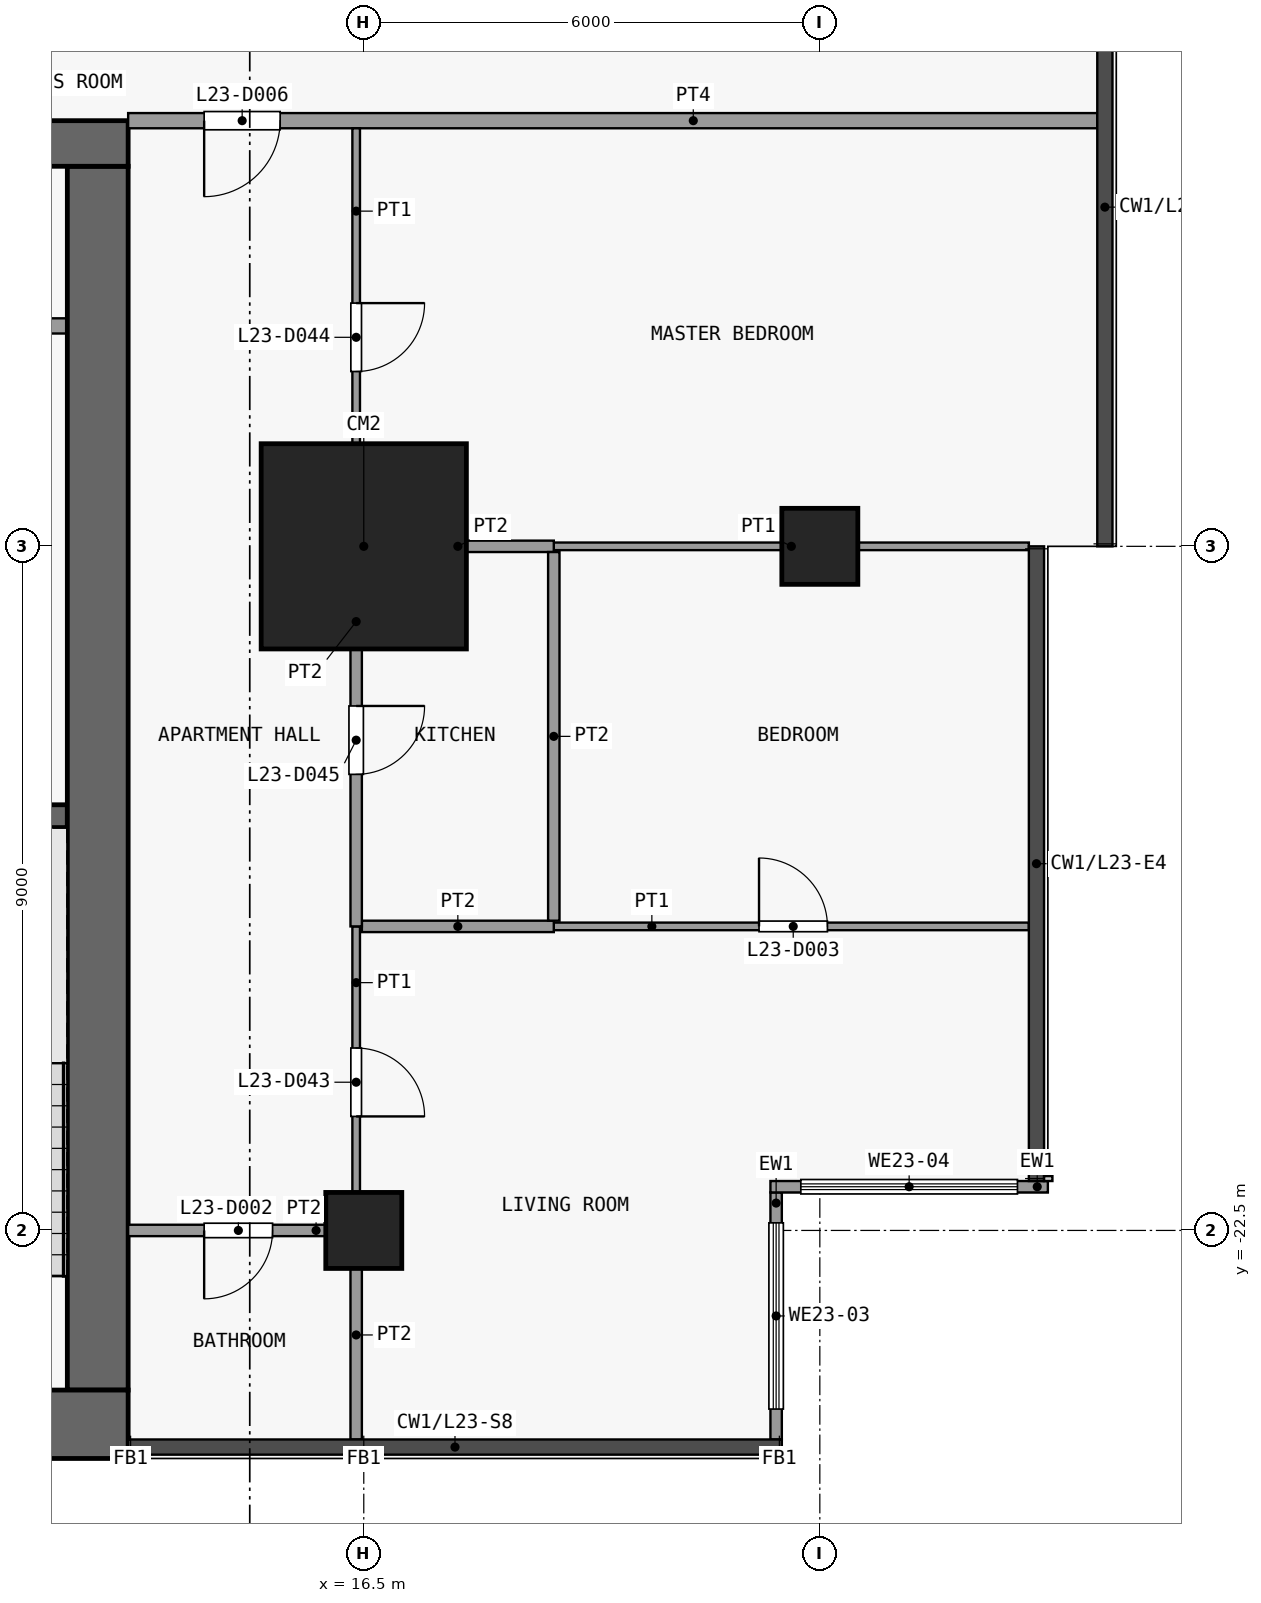
"""IFC4 building model, lengths in metres.
Left out: names, types, materials, properties, quantities, classifications, styles, units other than length and angle.
Written with IfcOpenShell. Run it as: python <this file> out.ifc"""

import sys

from ifc_helpers import new_model, si_unit, direction, frame, frame_2d, origin, origin_2d, place, context, subcontext, project, spatial, rectangle, extrude, element, fill, save


model = new_model("IFC4")
c1 = context("Model", 3, precision=1e-05, world=origin(), true_north=direction((0.0, 1.0)))
c2 = subcontext(c1, "Body", "Model", "MODEL_VIEW")
j1 = project(units=[si_unit("LENGTHUNIT", "METRE"), si_unit("PLANEANGLEUNIT", "RADIAN")], contexts=[c1])
p1 = place(None, origin())
s1 = spatial("IfcSite", under=j1, at=p1, CompositionType="ELEMENT")
p2 = place(p1, origin())
s2 = spatial("IfcBuilding", under=s1, at=p2, CompositionType="ELEMENT")
p3 = place(p2, frame((0.0, 0.0, 95.5)))
s3 = spatial("IfcBuildingStorey", under=s2, at=p3, CompositionType="ELEMENT", Elevation=95.5)
p4 = place(p3, frame((16.5, -22.5, 0.0), z_axis=(0.0, 0.0, 1.0), x_axis=(1.0, 0.0, 0.0)))
e1 = element("IfcColumn", 1, at=p4, inside=s3, PredefinedType="COLUMN", context=c2, shape_type="SweptSolid", body=[
    extrude(rectangle(XDim=1.0, YDim=1.0, at=origin_2d()), origin(), (0.0, 0.0, 1.0), 3.6),
])
p5 = place(p3, frame((16.5, -13.5, 0.0), z_axis=(0.0, 0.0, 1.0), x_axis=(1.0, 0.0, 0.0)))
e2 = element("IfcColumn", 2, at=p5, inside=s3, PredefinedType="COLUMN", context=c2, shape_type="SweptSolid", body=[
    extrude(rectangle(XDim=2.7, YDim=2.7, at=origin_2d()), origin(), (0.0, 0.0, 1.0), 3.6),
])
p6 = place(p3, frame((22.5, -13.5, 0.0), z_axis=(0.0, 0.0, 1.0), x_axis=(1.0, 0.0, 0.0)))
e3 = element("IfcColumn", 3, at=p6, inside=s3, PredefinedType="COLUMN", context=c2, shape_type="SweptSolid", body=[
    extrude(rectangle(XDim=1.0, YDim=1.0, at=origin_2d()), origin(), (0.0, 0.0, 1.0), 3.6),
])
p7 = place(p3, frame((-13.4, -25.05, 0.0), z_axis=(0.0, 0.0, 1.0), x_axis=(1.0, 0.0, 0.0)))
e4 = element("IfcWall", 4, at=p7, inside=s3, PredefinedType="SHEAR", context=c2, shape_type="SweptSolid", body=[
    extrude(rectangle(XDim=26.8, YDim=0.9, at=frame_2d((13.4, 0.0))), origin(), (0.0, 0.0, 1.0), 3.3),
])
p8 = place(p3, frame((-13.4, -8.2, 0.0), z_axis=(0.0, 0.0, 1.0), x_axis=(1.0, 0.0, 0.0)))
e5 = element("IfcWall", 5, at=p8, inside=s3, PredefinedType="SHEAR", context=c2, shape_type="SweptSolid", body=[
    extrude(rectangle(XDim=26.8, YDim=0.6, at=frame_2d((13.4, 0.0))), origin(), (0.0, 0.0, 1.0), 3.3),
])
p9 = place(p8, frame((7.7, 0.0, 0.0)))
e6 = element("IfcOpeningElement", 6, at=p9, cuts=e5, PredefinedType="OPENING", context=c2, shape_type="SweptSolid", body=[
    extrude(rectangle(XDim=1.8, YDim=2.1, at=frame_2d((0.9, 1.05))), frame((0.0, 0.31, 0.0), z_axis=(0.0, -1.0, 0.0), x_axis=(1.0, 0.0, 0.0)), (0.0, 0.0, 1.0), 0.62),
])
p10 = place(p8, frame((17.3, 0.0, 0.0)))
e7 = element("IfcOpeningElement", 7, at=p10, cuts=e5, PredefinedType="OPENING", context=c2, shape_type="SweptSolid", body=[
    extrude(rectangle(XDim=1.8, YDim=2.1, at=frame_2d((0.9, 1.05))), frame((0.0, 0.31, 0.0), z_axis=(0.0, -1.0, 0.0), x_axis=(1.0, 0.0, 0.0)), (0.0, 0.0, 1.0), 0.62),
])
p11 = place(p8, frame((2.625, 0.0, 0.0)))
e8 = element("IfcOpeningElement", 8, at=p11, cuts=e5, PredefinedType="OPENING", context=c2, shape_type="SweptSolid", body=[
    extrude(rectangle(XDim=0.9, YDim=2.1, at=frame_2d((0.45, 1.05))), frame((0.0, 0.31, 0.0), z_axis=(0.0, -1.0, 0.0), x_axis=(1.0, 0.0, 0.0)), (0.0, 0.0, 1.0), 0.62),
])
p12 = place(p8, frame((23.275, 0.0, 0.0)))
e9 = element("IfcOpeningElement", 9, at=p12, cuts=e5, PredefinedType="OPENING", context=c2, shape_type="SweptSolid", body=[
    extrude(rectangle(XDim=0.9, YDim=2.1, at=frame_2d((0.45, 1.05))), frame((0.0, 0.31, 0.0), z_axis=(0.0, -1.0, 0.0), x_axis=(1.0, 0.0, 0.0)), (0.0, 0.0, 1.0), 0.62),
])
p13 = place(p3, frame((13.0, -24.6, 0.0), z_axis=(0.0, 0.0, 1.0), x_axis=(0.0, 1.0, 0.0)))
e10 = element("IfcWall", 10, at=p13, inside=s3, PredefinedType="SHEAR", context=c2, shape_type="SweptSolid", body=[
    extrude(rectangle(XDim=16.1, YDim=0.8, at=frame_2d((8.05, 0.0))), origin(), (0.0, 0.0, 1.0), 3.3),
])
p14 = place(p3, frame((9.5, -17.05, 0.0), z_axis=(0.0, 0.0, 1.0), x_axis=(1.0, 0.0, 0.0)))
e11 = element("IfcWall", 11, at=p14, inside=s3, PredefinedType="SHEAR", context=c2, shape_type="SweptSolid", body=[
    extrude(rectangle(XDim=3.1, YDim=0.3, at=frame_2d((1.55, 0.0))), origin(), (0.0, 0.0, 1.0), 3.3),
])
p15 = place(p3, frame((11.15, -10.6, 0.0), z_axis=(0.0, 0.0, 1.0), x_axis=(1.0, 0.0, 0.0)))
e12 = element("IfcWall", 12, at=p15, inside=s3, PredefinedType="PARTITIONING", context=c2, shape_type="SweptSolid", body=[
    extrude(rectangle(XDim=1.45, YDim=0.2, at=frame_2d((0.725, 0.0))), origin(), (0.0, 0.0, 1.0), 3.3),
])
p16 = place(p3, frame((21.925, -22.0, 0.0), z_axis=(0.0, 0.0, 1.0), x_axis=(0.0, -1.0, 0.0)))
e13 = element("IfcWall", 13, at=p16, inside=s3, PredefinedType="SOLIDWALL", context=c2, shape_type="SweptSolid", body=[
    extrude(rectangle(XDim=3.25, YDim=0.15, at=frame_2d((1.625, 0.0))), origin(), (0.0, 0.0, 1.0), 3.3),
])
p17 = place(p16, frame((0.4, 0.0, 0.9)))
e14 = element("IfcOpeningElement", 14, at=p17, cuts=e13, PredefinedType="OPENING", context=c2, shape_type="SweptSolid", body=[
    extrude(rectangle(XDim=2.45, YDim=2.4, at=frame_2d((1.225, 1.2))), frame((0.0, 0.085, 0.0), z_axis=(0.0, -1.0, 0.0), x_axis=(1.0, 0.0, 0.0)), (0.0, 0.0, 1.0), 0.17),
])
p18 = place(p3, frame((25.5, -21.925, 0.0), z_axis=(0.0, 0.0, 1.0), x_axis=(-1.0, 0.0, 0.0)))
e15 = element("IfcWall", 15, at=p18, inside=s3, PredefinedType="SOLIDWALL", context=c2, shape_type="SweptSolid", body=[
    extrude(rectangle(XDim=3.65, YDim=0.15, at=frame_2d((1.825, 0.0))), origin(), (0.0, 0.0, 1.0), 3.3),
])
p19 = place(p18, frame((0.4, 0.0, 0.9)))
e16 = element("IfcOpeningElement", 16, at=p19, cuts=e15, PredefinedType="OPENING", context=c2, shape_type="SweptSolid", body=[
    extrude(rectangle(XDim=2.85, YDim=2.4, at=frame_2d((1.425, 1.2))), frame((0.0, 0.085, 0.0), z_axis=(0.0, -1.0, 0.0), x_axis=(1.0, 0.0, 0.0)), (0.0, 0.0, 1.0), 0.17),
])
p20 = place(p3, frame((13.4, -22.5, 0.0), z_axis=(0.0, 0.0, 1.0), x_axis=(1.0, 0.0, 0.0)))
e17 = element("IfcWall", 17, at=p20, inside=s3, PredefinedType="PARTITIONING", context=c2, shape_type="SweptSolid", body=[
    extrude(rectangle(XDim=2.925, YDim=0.15, at=frame_2d((1.462, 0.0))), origin(), (0.0, 0.0, 1.0), 3.3),
])
p21 = place(p20, frame((1.0, 0.0, 0.0)))
e18 = element("IfcOpeningElement", 18, at=p21, cuts=e17, PredefinedType="OPENING", context=c2, shape_type="SweptSolid", body=[
    extrude(rectangle(XDim=0.9, YDim=2.1, at=frame_2d((0.45, 1.05))), frame((0.0, 0.085, 0.0), z_axis=(0.0, -1.0, 0.0), x_axis=(1.0, 0.0, 0.0)), (0.0, 0.0, 1.0), 0.17),
])
p22 = place(p3, frame((19.0, -18.5, 0.0), z_axis=(0.0, 0.0, 1.0), x_axis=(1.0, 0.0, 0.0)))
e19 = element("IfcWall", 19, at=p22, inside=s3, PredefinedType="PARTITIONING", context=c2, shape_type="SweptSolid", body=[
    extrude(rectangle(XDim=6.25, YDim=0.1, at=frame_2d((3.125, 0.0))), origin(), (0.0, 0.0, 1.0), 3.3),
])
p23 = place(p22, frame((2.7, 0.0, 0.0)))
e20 = element("IfcOpeningElement", 20, at=p23, cuts=e19, PredefinedType="OPENING", context=c2, shape_type="SweptSolid", body=[
    extrude(rectangle(XDim=0.9, YDim=2.1, at=frame_2d((0.45, 1.05))), frame((0.0, 0.06, 0.0), z_axis=(0.0, -1.0, 0.0), x_axis=(1.0, 0.0, 0.0)), (0.0, 0.0, 1.0), 0.12),
])
p24 = place(p3, frame((16.475, -18.5, 0.0), z_axis=(0.0, 0.0, 1.0), x_axis=(1.0, 0.0, 0.0)))
e21 = element("IfcWall", 21, at=p24, inside=s3, PredefinedType="PARTITIONING", context=c2, shape_type="SweptSolid", body=[
    extrude(rectangle(XDim=2.525, YDim=0.15, at=frame_2d((1.262, 0.0))), origin(), (0.0, 0.0, 1.0), 3.3),
])
p25 = place(p3, frame((19.0, -13.5, 0.0), z_axis=(0.0, 0.0, 1.0), x_axis=(1.0, 0.0, 0.0)))
e22 = element("IfcWall", 22, at=p25, inside=s3, PredefinedType="PARTITIONING", context=c2, shape_type="SweptSolid", body=[
    extrude(rectangle(XDim=6.25, YDim=0.1, at=frame_2d((3.125, 0.0))), origin(), (0.0, 0.0, 1.0), 3.3),
])
p26 = place(p3, frame((16.475, -13.5, 0.0), z_axis=(0.0, 0.0, 1.0), x_axis=(1.0, 0.0, 0.0)))
e23 = element("IfcWall", 23, at=p26, inside=s3, PredefinedType="PARTITIONING", context=c2, shape_type="SweptSolid", body=[
    extrude(rectangle(XDim=2.525, YDim=0.15, at=frame_2d((1.262, 0.0))), origin(), (0.0, 0.0, 1.0), 3.3),
])
p27 = place(p3, frame((13.4, -7.9, 0.0), z_axis=(0.0, 0.0, 1.0), x_axis=(1.0, 0.0, 0.0)))
e24 = element("IfcWall", 24, at=p27, inside=s3, PredefinedType="PARTITIONING", context=c2, shape_type="SweptSolid", body=[
    extrude(rectangle(XDim=12.75, YDim=0.2, at=frame_2d((6.375, 0.0))), origin(), (0.0, 0.0, 1.0), 3.3),
])
p28 = place(p27, frame((1.0, 0.0, 0.0)))
e25 = element("IfcOpeningElement", 25, at=p28, cuts=e24, PredefinedType="OPENING", context=c2, shape_type="SweptSolid", body=[
    extrude(rectangle(XDim=1.0, YDim=2.1, at=frame_2d((0.5, 1.05))), frame((0.0, 0.11, 0.0), z_axis=(0.0, -1.0, 0.0), x_axis=(1.0, 0.0, 0.0)), (0.0, 0.0, 1.0), 0.22),
])
p29 = place(p3, frame((16.4, -22.5, 0.0), z_axis=(0.0, 0.0, 1.0), x_axis=(0.0, 1.0, 0.0)))
e26 = element("IfcWall", 26, at=p29, inside=s3, PredefinedType="PARTITIONING", context=c2, shape_type="SweptSolid", body=[
    extrude(rectangle(XDim=4.0, YDim=0.1, at=frame_2d((2.0, 0.0))), origin(), (0.0, 0.0, 1.0), 3.3),
])
p30 = place(p29, frame((1.5, 0.0, 0.0)))
e27 = element("IfcOpeningElement", 27, at=p30, cuts=e26, PredefinedType="OPENING", context=c2, shape_type="SweptSolid", body=[
    extrude(rectangle(XDim=0.9, YDim=2.1, at=frame_2d((0.45, 1.05))), frame((0.0, 0.06, 0.0), z_axis=(0.0, -1.0, 0.0), x_axis=(1.0, 0.0, 0.0)), (0.0, 0.0, 1.0), 0.12),
])
p31 = place(p3, frame((16.4, -13.5, 0.0), z_axis=(0.0, 0.0, 1.0), x_axis=(0.0, 1.0, 0.0)))
e28 = element("IfcWall", 28, at=p31, inside=s3, PredefinedType="PARTITIONING", context=c2, shape_type="SweptSolid", body=[
    extrude(rectangle(XDim=5.5, YDim=0.1, at=frame_2d((2.75, 0.0))), origin(), (0.0, 0.0, 1.0), 3.3),
])
p32 = place(p31, frame((2.3, 0.0, 0.0)))
e29 = element("IfcOpeningElement", 29, at=p32, cuts=e28, PredefinedType="OPENING", context=c2, shape_type="SweptSolid", body=[
    extrude(rectangle(XDim=0.9, YDim=2.1, at=frame_2d((0.45, 1.05))), frame((0.0, 0.06, 0.0), z_axis=(0.0, -1.0, 0.0), x_axis=(1.0, 0.0, 0.0)), (0.0, 0.0, 1.0), 0.12),
])
p33 = place(p3, frame((16.4, -25.25, 0.0), z_axis=(0.0, 0.0, 1.0), x_axis=(0.0, 1.0, 0.0)))
e30 = element("IfcWall", 30, at=p33, inside=s3, PredefinedType="PARTITIONING", context=c2, shape_type="SweptSolid", body=[
    extrude(rectangle(XDim=2.75, YDim=0.15, at=frame_2d((1.375, 0.0))), origin(), (0.0, 0.0, 1.0), 3.3),
])
p34 = place(p3, frame((16.4, -18.5, 0.0), z_axis=(0.0, 0.0, 1.0), x_axis=(0.0, 1.0, 0.0)))
e31 = element("IfcWall", 31, at=p34, inside=s3, PredefinedType="PARTITIONING", context=c2, shape_type="SweptSolid", body=[
    extrude(rectangle(XDim=5.0, YDim=0.15, at=frame_2d((2.5, 0.0))), origin(), (0.0, 0.0, 1.0), 3.3),
])
p35 = place(p34, frame((2.0, 0.0, 0.0)))
e32 = element("IfcOpeningElement", 32, at=p35, cuts=e31, PredefinedType="OPENING", context=c2, shape_type="SweptSolid", body=[
    extrude(rectangle(XDim=0.9, YDim=2.1, at=frame_2d((0.45, 1.05))), frame((0.0, 0.085, 0.0), z_axis=(0.0, -1.0, 0.0), x_axis=(1.0, 0.0, 0.0)), (0.0, 0.0, 1.0), 0.17),
])
p36 = place(p3, frame((19.0, -18.425, 0.0), z_axis=(0.0, 0.0, 1.0), x_axis=(0.0, 1.0, 0.0)))
e33 = element("IfcWall", 33, at=p36, inside=s3, PredefinedType="PARTITIONING", context=c2, shape_type="SweptSolid", body=[
    extrude(rectangle(XDim=4.85, YDim=0.15, at=frame_2d((2.425, 0.0))), origin(), (0.0, 0.0, 1.0), 3.3),
])
p37 = place(p17, origin())
e34 = element("IfcWindow", 34, at=p37, inside=s3, PartitioningType="SINGLE_PANEL", PredefinedType="WINDOW", context=c2, shape_type="SweptSolid", body=[
    extrude(rectangle(XDim=2.45, YDim=2.4, at=frame_2d((1.225, 1.2))), frame((0.0, 0.03, 0.0), z_axis=(0.0, -1.0, 0.0), x_axis=(1.0, 0.0, 0.0)), (0.0, 0.0, 1.0), 0.06),
])
fill(e14, e34)
p38 = place(p19, origin())
e35 = element("IfcWindow", 35, at=p38, inside=s3, PartitioningType="SINGLE_PANEL", PredefinedType="WINDOW", context=c2, shape_type="SweptSolid", body=[
    extrude(rectangle(XDim=2.85, YDim=2.4, at=frame_2d((1.425, 1.2))), frame((0.0, 0.03, 0.0), z_axis=(0.0, -1.0, 0.0), x_axis=(1.0, 0.0, 0.0)), (0.0, 0.0, 1.0), 0.06),
])
fill(e16, e35)
p39 = place(p21, origin())
e36 = element("IfcDoor", 36, at=p39, inside=s3, OperationType="SINGLE_SWING_LEFT", PredefinedType="DOOR", context=c2, shape_type="SweptSolid", body=[
    extrude(rectangle(XDim=0.9, YDim=2.1, at=frame_2d((0.45, 1.05))), frame((0.0, 0.025, 0.0), z_axis=(0.0, -1.0, 0.0), x_axis=(1.0, 0.0, 0.0)), (0.0, 0.0, 1.0), 0.05),
])
fill(e18, e36)
p40 = place(p23, origin())
e37 = element("IfcDoor", 37, at=p40, inside=s3, OperationType="SINGLE_SWING_RIGHT", PredefinedType="DOOR", context=c2, shape_type="SweptSolid", body=[
    extrude(rectangle(XDim=0.9, YDim=2.1, at=frame_2d((0.45, 1.05))), frame((0.0, 0.025, 0.0), z_axis=(0.0, -1.0, 0.0), x_axis=(1.0, 0.0, 0.0)), (0.0, 0.0, 1.0), 0.05),
])
fill(e20, e37)
p41 = place(p28, origin())
e38 = element("IfcDoor", 38, at=p41, inside=s3, OperationType="SINGLE_SWING_LEFT", PredefinedType="DOOR", context=c2, shape_type="SweptSolid", body=[
    extrude(rectangle(XDim=1.0, YDim=2.1, at=frame_2d((0.5, 1.05))), frame((0.0, 0.025, 0.0), z_axis=(0.0, -1.0, 0.0), x_axis=(1.0, 0.0, 0.0)), (0.0, 0.0, 1.0), 0.05),
])
fill(e25, e38)
p42 = place(p30, origin())
e39 = element("IfcDoor", 39, at=p42, inside=s3, OperationType="SINGLE_SWING_LEFT", PredefinedType="DOOR", context=c2, shape_type="SweptSolid", body=[
    extrude(rectangle(XDim=0.9, YDim=2.1, at=frame_2d((0.45, 1.05))), frame((0.0, 0.025, 0.0), z_axis=(0.0, -1.0, 0.0), x_axis=(1.0, 0.0, 0.0)), (0.0, 0.0, 1.0), 0.05),
])
fill(e27, e39)
p43 = place(p32, origin())
e40 = element("IfcDoor", 40, at=p43, inside=s3, OperationType="SINGLE_SWING_RIGHT", PredefinedType="DOOR", context=c2, shape_type="SweptSolid", body=[
    extrude(rectangle(XDim=0.9, YDim=2.1, at=frame_2d((0.45, 1.05))), frame((0.0, 0.025, 0.0), z_axis=(0.0, -1.0, 0.0), x_axis=(1.0, 0.0, 0.0)), (0.0, 0.0, 1.0), 0.05),
])
fill(e29, e40)
p44 = place(p35, origin())
e41 = element("IfcDoor", 41, at=p44, inside=s3, OperationType="SINGLE_SWING_RIGHT", PredefinedType="DOOR", context=c2, shape_type="SweptSolid", body=[
    extrude(rectangle(XDim=0.9, YDim=2.1, at=frame_2d((0.45, 1.05))), frame((0.0, 0.025, 0.0), z_axis=(0.0, -1.0, 0.0), x_axis=(1.0, 0.0, 0.0)), (0.0, 0.0, 1.0), 0.05),
])
fill(e32, e41)
save(model, sys.argv[1])
